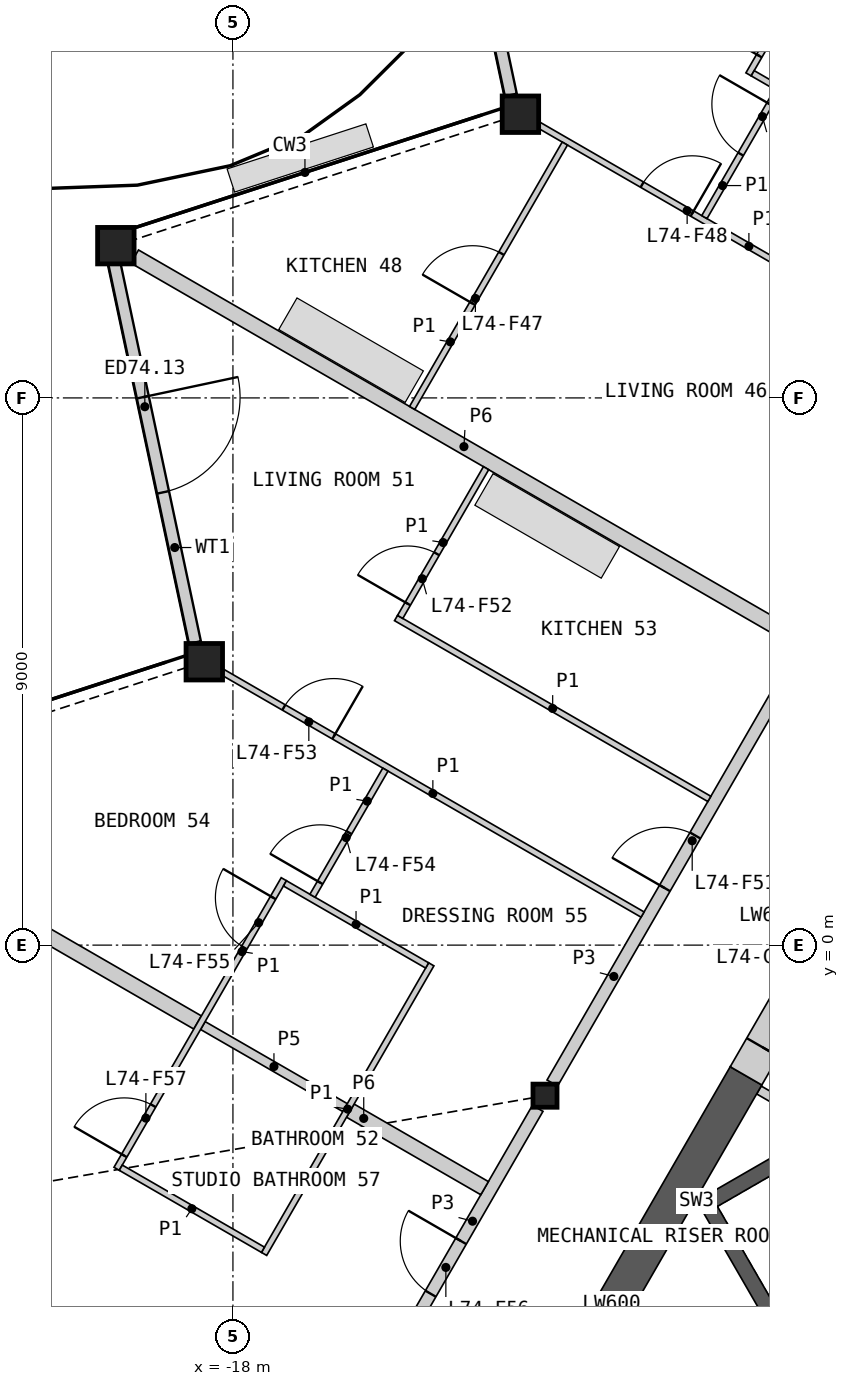
"""IFC4 building model, lengths in metres.
Left out: names, types, materials, properties, quantities, classifications, styles, units other than length and angle.
Written with IfcOpenShell. Run it as: python <this file> out.ifc"""

import sys

from ifc_helpers import new_model, si_unit, direction, frame, frame_2d, origin, origin_2d, place, context, subcontext, project, spatial, polyline, rectangle, hollow_rectangle, i_section, outline, extrude, element, fill, save


model = new_model("IFC4")
c1 = context("Model", 3, precision=1e-05, world=origin(), true_north=direction((0.0, 1.0)))
c2 = subcontext(c1, "Body", "Model", "MODEL_VIEW")
j1 = project(units=[si_unit("LENGTHUNIT", "METRE"), si_unit("PLANEANGLEUNIT", "RADIAN")], contexts=[c1])
p1 = place(None, origin())
s1 = spatial("IfcSite", under=j1, at=p1, CompositionType="ELEMENT")
p2 = place(p1, origin())
s2 = spatial("IfcBuilding", under=s1, at=p2, CompositionType="ELEMENT")
p3 = place(p2, frame((0.0, 0.0, 332.4)))
s3 = spatial("IfcBuildingStorey", under=s2, at=p3, CompositionType="ELEMENT", Elevation=332.4)
for number, where, z_axis, x_axis in (
    (1, (-13.272, 13.666, 0.0), (0.0, 0.0, 1.0), (1.0, 0.0, 0.0)),
    (2, (-19.926, 11.504, 0.0), (0.0, 0.0, 1.0), (1.0, 0.0, 0.0)),
    (3, (-18.471, 4.661, 0.0), (0.0, 0.0, 1.0), (1.0, 0.0, 0.0)),
):
    element("IfcColumn", number, at=place(p3, frame(where, z_axis=z_axis, x_axis=x_axis)), inside=s3, PredefinedType="COLUMN", context=c2, shape_type="SweptSolid", body=[
        extrude(hollow_rectangle(XDim=0.6, YDim=0.6, WallThickness=0.04, at=origin_2d()), origin(), (0.0, 0.0, 1.0), 3.4),
    ])
p4 = place(p3, frame((-12.868, -2.476, 0.0), z_axis=(0.0, 0.0, 1.0), x_axis=(1.0, 0.0, 0.0)))
e4 = element("IfcColumn", 4, at=p4, inside=s3, PredefinedType="COLUMN", context=c2, shape_type="SweptSolid", body=[
    extrude(i_section(OverallWidth=0.396, OverallDepth=0.381, WebThickness=0.019, FlangeThickness=0.03, at=origin_2d()), origin(), (0.0, 0.0, 1.0), 3.4),
])
p5 = place(p3, frame((-14.756, 20.225, 0.0), z_axis=(0.0, 0.0, 1.0), x_axis=(0.207888038934, -0.978152627798, 0.0)))
e5 = element("IfcWall", 5, at=p5, inside=s3, PredefinedType="SOLIDWALL", context=c2, shape_type="SweptSolid", body=[
    extrude(rectangle(XDim=6.382, YDim=0.2, at=frame_2d((3.191, 0.0))), origin(), (0.0, 0.0, 1.0), 2.488),
])
p6 = place(p5, frame((2.262, 0.0, 0.0)))
e6 = element("IfcOpeningElement", 6, at=p6, cuts=e5, PredefinedType="OPENING", context=c2, shape_type="SweptSolid", body=[
    extrude(rectangle(XDim=1.6, YDim=2.25, at=frame_2d((0.8, 1.125))), frame((0.0, 0.11, 0.0), z_axis=(0.0, -1.0, 0.0), x_axis=(1.0, 0.0, 0.0)), (0.0, 0.0, 1.0), 0.22),
])
p7 = place(p3, frame((-19.953, 11.225, 0.0), z_axis=(0.0, 0.0, 1.0), x_axis=(0.207915447, -0.978146802325, 0.0)))
e7 = element("IfcWall", 7, at=p7, inside=s3, PredefinedType="SOLIDWALL", context=c2, shape_type="SweptSolid", body=[
    extrude(rectangle(XDim=6.387, YDim=0.2, at=frame_2d((3.193, 0.0))), origin(), (0.0, 0.0, 1.0), 2.488),
])
p8 = place(p7, frame((2.262, 0.0, 0.0)))
e8 = element("IfcOpeningElement", 8, at=p8, cuts=e7, PredefinedType="OPENING", context=c2, shape_type="SweptSolid", body=[
    extrude(rectangle(XDim=1.6, YDim=2.25, at=frame_2d((0.8, 1.125))), frame((0.0, 0.11, 0.0), z_axis=(0.0, -1.0, 0.0), x_axis=(1.0, 0.0, 0.0)), (0.0, 0.0, 1.0), 0.22),
])
p9 = place(p3, origin())
e9 = element("IfcWall", 9, at=p9, inside=s3, PredefinedType="SHEAR", context=c2, shape_type="SweptSolid", body=[
    extrude(outline(polyline([(-5.307, -1.281), (-10.374, -4.206), (-10.032, -4.298), (-5.182, -1.498), (-5.307, -1.281)])), origin(), (0.0, 0.0, 1.0), 3.1),
])
p10 = place(p3, origin())
e10 = element("IfcWall", 10, at=p10, inside=s3, PredefinedType="SHEAR", context=c2, shape_type="SweptSolid", body=[
    extrude(outline(polyline([(-10.374, -4.206), (-8.83, -6.881), (-8.738, -6.539), (-10.032, -4.298), (-10.374, -4.206)])), origin(), (0.0, 0.0, 1.0), 3.1),
])
p11 = place(p3, frame((-9.35, -2.383, 0.0), z_axis=(0.0, 0.0, 1.0), x_axis=(0.866057962423, -0.499943602543, 0.0)))
e11 = element("IfcWall", 11, at=p11, inside=s3, PredefinedType="PARTITIONING", context=c2, shape_type="SweptSolid", body=[
    extrude(rectangle(XDim=1.242, YDim=0.15, at=frame_2d((0.621, 0.0))), origin(), (0.0, 0.0, 1.0), 3.1),
])
p12 = place(p3, frame((-9.562, -2.15, 0.0), z_axis=(0.0, 0.0, 1.0), x_axis=(-0.500015214976, -0.866016619236, 0.0)))
e12 = element("IfcWall", 12, at=p12, inside=s3, PredefinedType="SHEAR", context=c2, shape_type="SweptSolid", body=[
    extrude(rectangle(XDim=5.318, YDim=0.6, at=frame_2d((2.659, 0.0))), origin(), (0.0, 0.0, 1.0), 3.1),
])
p13 = place(p3, frame((-8.44, -0.208, 0.0), z_axis=(0.0, 0.0, 1.0), x_axis=(-0.500001951578, -0.866024277037, 0.0)))
e13 = element("IfcWall", 13, at=p13, inside=s3, PredefinedType="SHEAR", context=c2, shape_type="SweptSolid", body=[
    extrude(rectangle(XDim=2.243, YDim=0.6, at=frame_2d((1.122, 0.0))), origin(), (0.0, 0.0, 1.0), 3.1),
])
p14 = place(p13, frame((0.7, 0.0, 0.0)))
e14 = element("IfcOpeningElement", 14, at=p14, cuts=e13, PredefinedType="OPENING", context=c2, shape_type="SweptSolid", body=[
    extrude(rectangle(XDim=1.0, YDim=2.1, at=frame_2d((0.5, 1.05))), frame((0.0, 0.31, 0.0), z_axis=(0.0, -1.0, 0.0), x_axis=(1.0, 0.0, 0.0)), (0.0, 0.0, 1.0), 0.62),
])
p15 = place(p3, frame((-19.615, 11.325, 0.0), z_axis=(0.0, 0.0, 1.0), x_axis=(0.86602139559, -0.500006942333, 0.0)))
e15 = element("IfcWall", 15, at=p15, inside=s3, PredefinedType="PARTITIONING", context=c2, shape_type="SweptSolid", body=[
    extrude(rectangle(XDim=12.505, YDim=0.25, at=frame_2d((6.252, 0.0))), origin(), (0.0, 0.0, 1.0), 2.33),
])
p16 = place(p3, frame((-12.748, -2.269, 0.0), z_axis=(0.0, 0.0, 1.0), x_axis=(0.499984266882, 0.866034487114, 0.0)))
e16 = element("IfcWall", 16, at=p16, inside=s3, PredefinedType="PARTITIONING", context=c2, shape_type="SweptSolid", body=[
    extrude(rectangle(XDim=8.099, YDim=0.2, at=frame_2d((4.049, 0.0))), origin(), (0.0, 0.0, 1.0), 3.1),
])
p17 = place(p16, frame((3.702, 0.0, 0.0)))
e17 = element("IfcOpeningElement", 17, at=p17, cuts=e16, PredefinedType="OPENING", context=c2, shape_type="SweptSolid", body=[
    extrude(rectangle(XDim=1.0, YDim=2.1, at=frame_2d((0.5, 1.05))), frame((0.0, 0.11, 0.0), z_axis=(0.0, -1.0, 0.0), x_axis=(1.0, 0.0, 0.0)), (0.0, 0.0, 1.0), 0.22),
])
p18 = place(p3, frame((-24.815, 2.326, 0.0), z_axis=(0.0, 0.0, 1.0), x_axis=(0.866024038922, -0.500002364004, 0.0)))
e18 = element("IfcWall", 18, at=p18, inside=s3, PredefinedType="PARTITIONING", context=c2, shape_type="SweptSolid", body=[
    extrude(rectangle(XDim=7.198, YDim=0.25, at=frame_2d((3.599, 0.0))), origin(), (0.0, 0.0, 1.0), 2.33),
])
p19 = place(p3, frame((-15.131, -6.397, 0.0), z_axis=(0.0, 0.0, 1.0), x_axis=(0.500003406062, 0.866023437285, 0.0)))
e19 = element("IfcWall", 19, at=p19, inside=s3, PredefinedType="PARTITIONING", context=c2, shape_type="SweptSolid", body=[
    extrude(rectangle(XDim=4.288, YDim=0.2, at=frame_2d((2.144, 0.0))), origin(), (0.0, 0.0, 1.0), 3.1),
])
p20 = place(p19, frame((0.766, 0.0, 0.0)))
e20 = element("IfcOpeningElement", 20, at=p20, cuts=e19, PredefinedType="OPENING", context=c2, shape_type="SweptSolid", body=[
    extrude(rectangle(XDim=1.0, YDim=2.1, at=frame_2d((0.5, 1.05))), frame((0.0, 0.11, 0.0), z_axis=(0.0, -1.0, 0.0), x_axis=(1.0, 0.0, 0.0)), (0.0, 0.0, 1.0), 0.22),
])
p21 = place(p3, frame((-16.07, -2.722, 0.0), z_axis=(0.0, 0.0, 1.0), x_axis=(0.866030925526, -0.499990435942, 0.0)))
e21 = element("IfcWall", 21, at=p21, inside=s3, PredefinedType="PARTITIONING", context=c2, shape_type="SweptSolid", body=[
    extrude(rectangle(XDim=2.55, YDim=0.25, at=frame_2d((1.275, 0.0))), origin(), (0.0, 0.0, 1.0), 2.33),
])
p22 = place(p3, frame((-18.495, -1.323, 0.0), z_axis=(0.0, 0.0, 1.0), x_axis=(0.866059108428, -0.4999416173, 0.0)))
e22 = element("IfcWall", 22, at=p22, inside=s3, PredefinedType="PLUMBINGWALL", context=c2, shape_type="SweptSolid", body=[
    extrude(rectangle(XDim=2.7, YDim=0.15, at=frame_2d((1.35, 0.0))), origin(), (0.0, 0.0, 1.0), 2.33),
])
p23 = place(p3, frame((-18.161, 4.485, 0.0), z_axis=(0.0, 0.0, 1.0), x_axis=(0.866023773276, -0.500002824113, 0.0)))
e23 = element("IfcWall", 23, at=p23, inside=s3, PredefinedType="PARTITIONING", context=c2, shape_type="SweptSolid", body=[
    extrude(rectangle(XDim=7.965, YDim=0.1, at=frame_2d((3.982, 0.0))), origin(), (0.0, 0.0, 1.0), 2.33),
])
p24 = place(p23, frame((1.152, 0.0, 0.0)))
e24 = element("IfcOpeningElement", 24, at=p24, cuts=e23, PredefinedType="OPENING", context=c2, shape_type="SweptSolid", body=[
    extrude(rectangle(XDim=0.95, YDim=2.1, at=frame_2d((0.475, 1.05))), frame((0.0, 0.06, 0.0), z_axis=(0.0, -1.0, 0.0), x_axis=(1.0, 0.0, 0.0)), (0.0, 0.0, 1.0), 0.12),
])
p25 = place(p3, frame((-12.962, 13.484, 0.0), z_axis=(0.0, 0.0, 1.0), x_axis=(0.866032392051, -0.499987895772, 0.0)))
e25 = element("IfcWall", 25, at=p25, inside=s3, PredefinedType="PARTITIONING", context=c2, shape_type="SweptSolid", body=[
    extrude(rectangle(XDim=7.962, YDim=0.1, at=frame_2d((3.981, 0.0))), origin(), (0.0, 0.0, 1.0), 2.33),
])
p26 = place(p25, frame((1.953, 0.0, 0.0)))
e26 = element("IfcOpeningElement", 26, at=p26, cuts=e25, PredefinedType="OPENING", context=c2, shape_type="SweptSolid", body=[
    extrude(rectangle(XDim=0.95, YDim=2.1, at=frame_2d((0.475, 1.05))), frame((0.0, 0.06, 0.0), z_axis=(0.0, -1.0, 0.0), x_axis=(1.0, 0.0, 0.0)), (0.0, 0.0, 1.0), 0.12),
])
p27 = place(p3, frame((-15.318, 5.38, 0.0), z_axis=(0.0, 0.0, 1.0), x_axis=(0.866035260786, -0.499982926783, 0.0)))
e27 = element("IfcWall", 27, at=p27, inside=s3, PredefinedType="PARTITIONING", context=c2, shape_type="SweptSolid", body=[
    extrude(rectangle(XDim=5.95, YDim=0.1, at=frame_2d((2.975, 0.0))), origin(), (0.0, 0.0, 1.0), 2.33),
])
p28 = place(p3, frame((-17.488, -5.079, 0.0), z_axis=(0.0, 0.0, 1.0), x_axis=(0.499996545922, 0.866027397988, 0.0)))
e28 = element("IfcWall", 28, at=p28, inside=s3, PredefinedType="PARTITIONING", context=c2, shape_type="SweptSolid", body=[
    extrude(rectangle(XDim=5.5, YDim=0.1, at=frame_2d((2.75, 0.0))), origin(), (0.0, 0.0, 1.0), 2.33),
])
p29 = place(p3, frame((-19.913, -3.679, 0.0), z_axis=(0.0, 0.0, 1.0), x_axis=(0.500015767406, 0.866016300277, 0.0)))
e29 = element("IfcWall", 29, at=p29, inside=s3, PredefinedType="PARTITIONING", context=c2, shape_type="SweptSolid", body=[
    extrude(rectangle(XDim=5.5, YDim=0.1, at=frame_2d((2.75, 0.0))), origin(), (0.0, 0.0, 1.0), 2.33),
])
p30 = place(p29, frame((4.199, 0.0, 0.0)))
e30 = element("IfcOpeningElement", 30, at=p30, cuts=e29, PredefinedType="OPENING", context=c2, shape_type="SweptSolid", body=[
    extrude(rectangle(XDim=0.95, YDim=2.1, at=frame_2d((0.475, 1.05))), frame((0.0, 0.06, 0.0), z_axis=(0.0, -1.0, 0.0), x_axis=(1.0, 0.0, 0.0)), (0.0, 0.0, 1.0), 0.12),
])
p31 = place(p29, frame((0.25, 0.0, 0.0)))
e31 = element("IfcOpeningElement", 31, at=p31, cuts=e29, PredefinedType="OPENING", context=c2, shape_type="SweptSolid", body=[
    extrude(rectangle(XDim=0.95, YDim=2.1, at=frame_2d((0.475, 1.05))), frame((0.0, 0.06, 0.0), z_axis=(0.0, -1.0, 0.0), x_axis=(1.0, 0.0, 0.0)), (0.0, 0.0, 1.0), 0.12),
])
p32 = place(p3, frame((-9.52, 14.321, 0.0), z_axis=(0.0, 0.0, 1.0), x_axis=(0.49997732567, 0.866038494419, 0.0)))
e32 = element("IfcWall", 32, at=p32, inside=s3, PredefinedType="PARTITIONING", context=c2, shape_type="SweptSolid", body=[
    extrude(rectangle(XDim=5.5, YDim=0.1, at=frame_2d((2.75, 0.0))), origin(), (0.0, 0.0, 1.0), 2.33),
])
p33 = place(p32, frame((4.3, 0.0, 0.0)))
e33 = element("IfcOpeningElement", 33, at=p33, cuts=e32, PredefinedType="OPENING", context=c2, shape_type="SweptSolid", body=[
    extrude(rectangle(XDim=0.95, YDim=2.1, at=frame_2d((0.475, 1.05))), frame((0.0, 0.06, 0.0), z_axis=(0.0, -1.0, 0.0), x_axis=(1.0, 0.0, 0.0)), (0.0, 0.0, 1.0), 0.12),
])
p34 = place(p32, frame((0.351, 0.0, 0.0)))
e34 = element("IfcOpeningElement", 34, at=p34, cuts=e32, PredefinedType="OPENING", context=c2, shape_type="SweptSolid", body=[
    extrude(rectangle(XDim=0.95, YDim=2.1, at=frame_2d((0.475, 1.05))), frame((0.0, 0.06, 0.0), z_axis=(0.0, -1.0, 0.0), x_axis=(1.0, 0.0, 0.0)), (0.0, 0.0, 1.0), 0.12),
])
p35 = place(p3, frame((-15.052, 8.835, 0.0), z_axis=(0.0, 0.0, 1.0), x_axis=(0.500008642379, 0.866020414047, 0.0)))
e35 = element("IfcWall", 35, at=p35, inside=s3, PredefinedType="PARTITIONING", context=c2, shape_type="SweptSolid", body=[
    extrude(rectangle(XDim=5.021, YDim=0.1, at=frame_2d((2.511, 0.0))), origin(), (0.0, 0.0, 1.0), 2.33),
])
p36 = place(p35, frame((1.985, 0.0, 0.0)))
e36 = element("IfcOpeningElement", 36, at=p36, cuts=e35, PredefinedType="OPENING", context=c2, shape_type="SweptSolid", body=[
    extrude(rectangle(XDim=0.95, YDim=2.1, at=frame_2d((0.475, 1.05))), frame((0.0, 0.06, 0.0), z_axis=(0.0, -1.0, 0.0), x_axis=(1.0, 0.0, 0.0)), (0.0, 0.0, 1.0), 0.12),
])
p37 = place(p3, frame((-15.25, 5.398, 0.0), z_axis=(0.0, 0.0, 1.0), x_axis=(0.499959355765, 0.866048868473, 0.0)))
e37 = element("IfcWall", 37, at=p37, inside=s3, PredefinedType="PARTITIONING", context=c2, shape_type="SweptSolid", body=[
    extrude(rectangle(XDim=2.825, YDim=0.1, at=frame_2d((1.413, 0.0))), origin(), (0.0, 0.0, 1.0), 2.33),
])
p38 = place(p37, frame((0.25, 0.0, 0.0)))
e38 = element("IfcOpeningElement", 38, at=p38, cuts=e37, PredefinedType="OPENING", context=c2, shape_type="SweptSolid", body=[
    extrude(rectangle(XDim=0.95, YDim=2.1, at=frame_2d((0.475, 1.05))), frame((0.0, 0.06, 0.0), z_axis=(0.0, -1.0, 0.0), x_axis=(1.0, 0.0, 0.0)), (0.0, 0.0, 1.0), 0.12),
])
p39 = place(p3, frame((-19.844, -3.661, 0.0), z_axis=(0.0, 0.0, 1.0), x_axis=(0.86599734893, -0.500048589285, 0.0)))
e39 = element("IfcWall", 39, at=p39, inside=s3, PredefinedType="PARTITIONING", context=c2, shape_type="SweptSolid", body=[
    extrude(rectangle(XDim=2.7, YDim=0.1, at=frame_2d((1.35, 0.0))), origin(), (0.0, 0.0, 1.0), 2.33),
])
p40 = place(p3, frame((-9.452, 14.34, 0.0), z_axis=(0.0, 0.0, 1.0), x_axis=(0.866036505625, -0.499980770555, 0.0)))
e40 = element("IfcWall", 40, at=p40, inside=s3, PredefinedType="PARTITIONING", context=c2, shape_type="SweptSolid", body=[
    extrude(rectangle(XDim=2.7, YDim=0.1, at=frame_2d((1.35, 0.0))), origin(), (0.0, 0.0, 1.0), 2.33),
])
p41 = place(p3, frame((-17.145, 1.016, 0.0), z_axis=(0.0, 0.0, 1.0), x_axis=(0.86599734893, -0.500048589285, 0.0)))
e41 = element("IfcWall", 41, at=p41, inside=s3, PredefinedType="PARTITIONING", context=c2, shape_type="SweptSolid", body=[
    extrude(rectangle(XDim=2.7, YDim=0.1, at=frame_2d((1.35, 0.0))), origin(), (0.0, 0.0, 1.0), 2.33),
])
p42 = place(p3, frame((-16.691, 0.812, 0.0), z_axis=(0.0, 0.0, 1.0), x_axis=(0.499963527173, 0.866046460357, 0.0)))
e42 = element("IfcWall", 42, at=p42, inside=s3, PredefinedType="PARTITIONING", context=c2, shape_type="SweptSolid", body=[
    extrude(rectangle(XDim=2.396, YDim=0.1, at=frame_2d((1.198, 0.0))), origin(), (0.0, 0.0, 1.0), 2.33),
])
p43 = place(p42, frame((0.25, 0.0, 0.0)))
e43 = element("IfcOpeningElement", 43, at=p43, cuts=e42, PredefinedType="OPENING", context=c2, shape_type="SweptSolid", body=[
    extrude(rectangle(XDim=0.95, YDim=2.1, at=frame_2d((0.475, 1.05))), frame((0.0, 0.06, 0.0), z_axis=(0.0, -1.0, 0.0), x_axis=(1.0, 0.0, 0.0)), (0.0, 0.0, 1.0), 0.12),
])
p44 = place(p3, frame((-10.247, 11.974, 0.0), z_axis=(0.0, 0.0, 1.0), x_axis=(0.499995825336, 0.866027814014, 0.0)))
e44 = element("IfcWall", 44, at=p44, inside=s3, PredefinedType="PARTITIONING", context=c2, shape_type="SweptSolid", body=[
    extrude(rectangle(XDim=2.396, YDim=0.1, at=frame_2d((1.198, 0.0))), origin(), (0.0, 0.0, 1.0), 2.33),
])
p45 = place(p44, frame((1.196, 0.0, 0.0)))
e45 = element("IfcOpeningElement", 45, at=p45, cuts=e44, PredefinedType="OPENING", context=c2, shape_type="SweptSolid", body=[
    extrude(rectangle(XDim=0.95, YDim=2.1, at=frame_2d((0.475, 1.05))), frame((0.0, 0.06, 0.0), z_axis=(0.0, -1.0, 0.0), x_axis=(1.0, 0.0, 0.0)), (0.0, 0.0, 1.0), 0.12),
])
p46 = place(p8, origin())
e46 = element("IfcDoor", 46, at=p46, inside=s3, OperationType="DOUBLE_DOOR_SINGLE_SWING", PredefinedType="DOOR", context=c2, shape_type="SweptSolid", body=[
    extrude(rectangle(XDim=1.6, YDim=2.25, at=frame_2d((0.8, 1.125))), frame((0.0, 0.025, 0.0), z_axis=(0.0, -1.0, 0.0), x_axis=(1.0, 0.0, 0.0)), (0.0, 0.0, 1.0), 0.05),
])
fill(e8, e46)
p47 = place(p14, origin())
e47 = element("IfcDoor", 47, at=p47, inside=s3, OperationType="SINGLE_SWING_RIGHT", PredefinedType="DOOR", context=c2, shape_type="SweptSolid", body=[
    extrude(rectangle(XDim=1.0, YDim=2.1, at=frame_2d((0.5, 1.05))), frame((0.0, 0.055, 0.0), z_axis=(0.0, -1.0, 0.0), x_axis=(1.0, 0.0, 0.0)), (0.0, 0.0, 1.0), 0.05),
])
fill(e14, e47)
p48 = place(p36, origin())
e48 = element("IfcDoor", 48, at=p48, inside=s3, OperationType="SINGLE_SWING_LEFT", PredefinedType="DOOR", context=c2, shape_type="SweptSolid", body=[
    extrude(rectangle(XDim=0.95, YDim=2.1, at=frame_2d((0.475, 1.05))), frame((0.0, 0.025, 0.0), z_axis=(0.0, -1.0, 0.0), x_axis=(1.0, 0.0, 0.0)), (0.0, 0.0, 1.0), 0.05),
])
fill(e36, e48)
p49 = place(p26, origin())
e49 = element("IfcDoor", 49, at=p49, inside=s3, OperationType="SINGLE_SWING_RIGHT", PredefinedType="DOOR", context=c2, shape_type="SweptSolid", body=[
    extrude(rectangle(XDim=0.95, YDim=2.1, at=frame_2d((0.475, 1.05))), frame((0.0, 0.025, 0.0), z_axis=(0.0, -1.0, 0.0), x_axis=(1.0, 0.0, 0.0)), (0.0, 0.0, 1.0), 0.05),
])
fill(e26, e49)
p50 = place(p45, origin())
e50 = element("IfcDoor", 50, at=p50, inside=s3, OperationType="SINGLE_SWING_RIGHT", PredefinedType="DOOR", context=c2, shape_type="SweptSolid", body=[
    extrude(rectangle(XDim=0.95, YDim=2.1, at=frame_2d((0.475, 1.05))), frame((0.0, 0.025, 0.0), z_axis=(0.0, -1.0, 0.0), x_axis=(1.0, 0.0, 0.0)), (0.0, 0.0, 1.0), 0.05),
])
fill(e45, e50)
p51 = place(p34, origin())
e51 = element("IfcDoor", 51, at=p51, inside=s3, OperationType="SINGLE_SWING_LEFT", PredefinedType="DOOR", context=c2, shape_type="SweptSolid", body=[
    extrude(rectangle(XDim=0.95, YDim=2.1, at=frame_2d((0.475, 1.05))), frame((0.0, 0.025, 0.0), z_axis=(0.0, -1.0, 0.0), x_axis=(1.0, 0.0, 0.0)), (0.0, 0.0, 1.0), 0.05),
])
fill(e34, e51)
p52 = place(p17, origin())
e52 = element("IfcDoor", 52, at=p52, inside=s3, OperationType="SINGLE_SWING_LEFT", PredefinedType="DOOR", context=c2, shape_type="SweptSolid", body=[
    extrude(rectangle(XDim=1.0, YDim=2.1, at=frame_2d((0.5, 1.05))), frame((0.0, 0.025, 0.0), z_axis=(0.0, -1.0, 0.0), x_axis=(1.0, 0.0, 0.0)), (0.0, 0.0, 1.0), 0.05),
])
fill(e17, e52)
p53 = place(p38, origin())
e53 = element("IfcDoor", 53, at=p53, inside=s3, OperationType="SINGLE_SWING_LEFT", PredefinedType="DOOR", context=c2, shape_type="SweptSolid", body=[
    extrude(rectangle(XDim=0.95, YDim=2.1, at=frame_2d((0.475, 1.05))), frame((0.0, 0.025, 0.0), z_axis=(0.0, -1.0, 0.0), x_axis=(1.0, 0.0, 0.0)), (0.0, 0.0, 1.0), 0.05),
])
fill(e38, e53)
p54 = place(p24, origin())
e54 = element("IfcDoor", 54, at=p54, inside=s3, OperationType="SINGLE_SWING_RIGHT", PredefinedType="DOOR", context=c2, shape_type="SweptSolid", body=[
    extrude(rectangle(XDim=0.95, YDim=2.1, at=frame_2d((0.475, 1.05))), frame((0.0, 0.025, 0.0), z_axis=(0.0, -1.0, 0.0), x_axis=(1.0, 0.0, 0.0)), (0.0, 0.0, 1.0), 0.05),
])
fill(e24, e54)
p55 = place(p43, origin())
e55 = element("IfcDoor", 55, at=p55, inside=s3, OperationType="SINGLE_SWING_LEFT", PredefinedType="DOOR", context=c2, shape_type="SweptSolid", body=[
    extrude(rectangle(XDim=0.95, YDim=2.1, at=frame_2d((0.475, 1.05))), frame((0.0, 0.025, 0.0), z_axis=(0.0, -1.0, 0.0), x_axis=(1.0, 0.0, 0.0)), (0.0, 0.0, 1.0), 0.05),
])
fill(e43, e55)
p56 = place(p30, origin())
e56 = element("IfcDoor", 56, at=p56, inside=s3, OperationType="SINGLE_SWING_RIGHT", PredefinedType="DOOR", context=c2, shape_type="SweptSolid", body=[
    extrude(rectangle(XDim=0.95, YDim=2.1, at=frame_2d((0.475, 1.05))), frame((0.0, 0.025, 0.0), z_axis=(0.0, -1.0, 0.0), x_axis=(1.0, 0.0, 0.0)), (0.0, 0.0, 1.0), 0.05),
])
fill(e30, e56)
p57 = place(p20, origin())
e57 = element("IfcDoor", 57, at=p57, inside=s3, OperationType="SINGLE_SWING_RIGHT", PredefinedType="DOOR", context=c2, shape_type="SweptSolid", body=[
    extrude(rectangle(XDim=1.0, YDim=2.1, at=frame_2d((0.5, 1.05))), frame((0.0, 0.025, 0.0), z_axis=(0.0, -1.0, 0.0), x_axis=(1.0, 0.0, 0.0)), (0.0, 0.0, 1.0), 0.05),
])
fill(e20, e57)
p58 = place(p31, origin())
e58 = element("IfcDoor", 58, at=p58, inside=s3, OperationType="SINGLE_SWING_LEFT", PredefinedType="DOOR", context=c2, shape_type="SweptSolid", body=[
    extrude(rectangle(XDim=0.95, YDim=2.1, at=frame_2d((0.475, 1.05))), frame((0.0, 0.025, 0.0), z_axis=(0.0, -1.0, 0.0), x_axis=(1.0, 0.0, 0.0)), (0.0, 0.0, 1.0), 0.05),
])
fill(e31, e58)
save(model, sys.argv[1])
